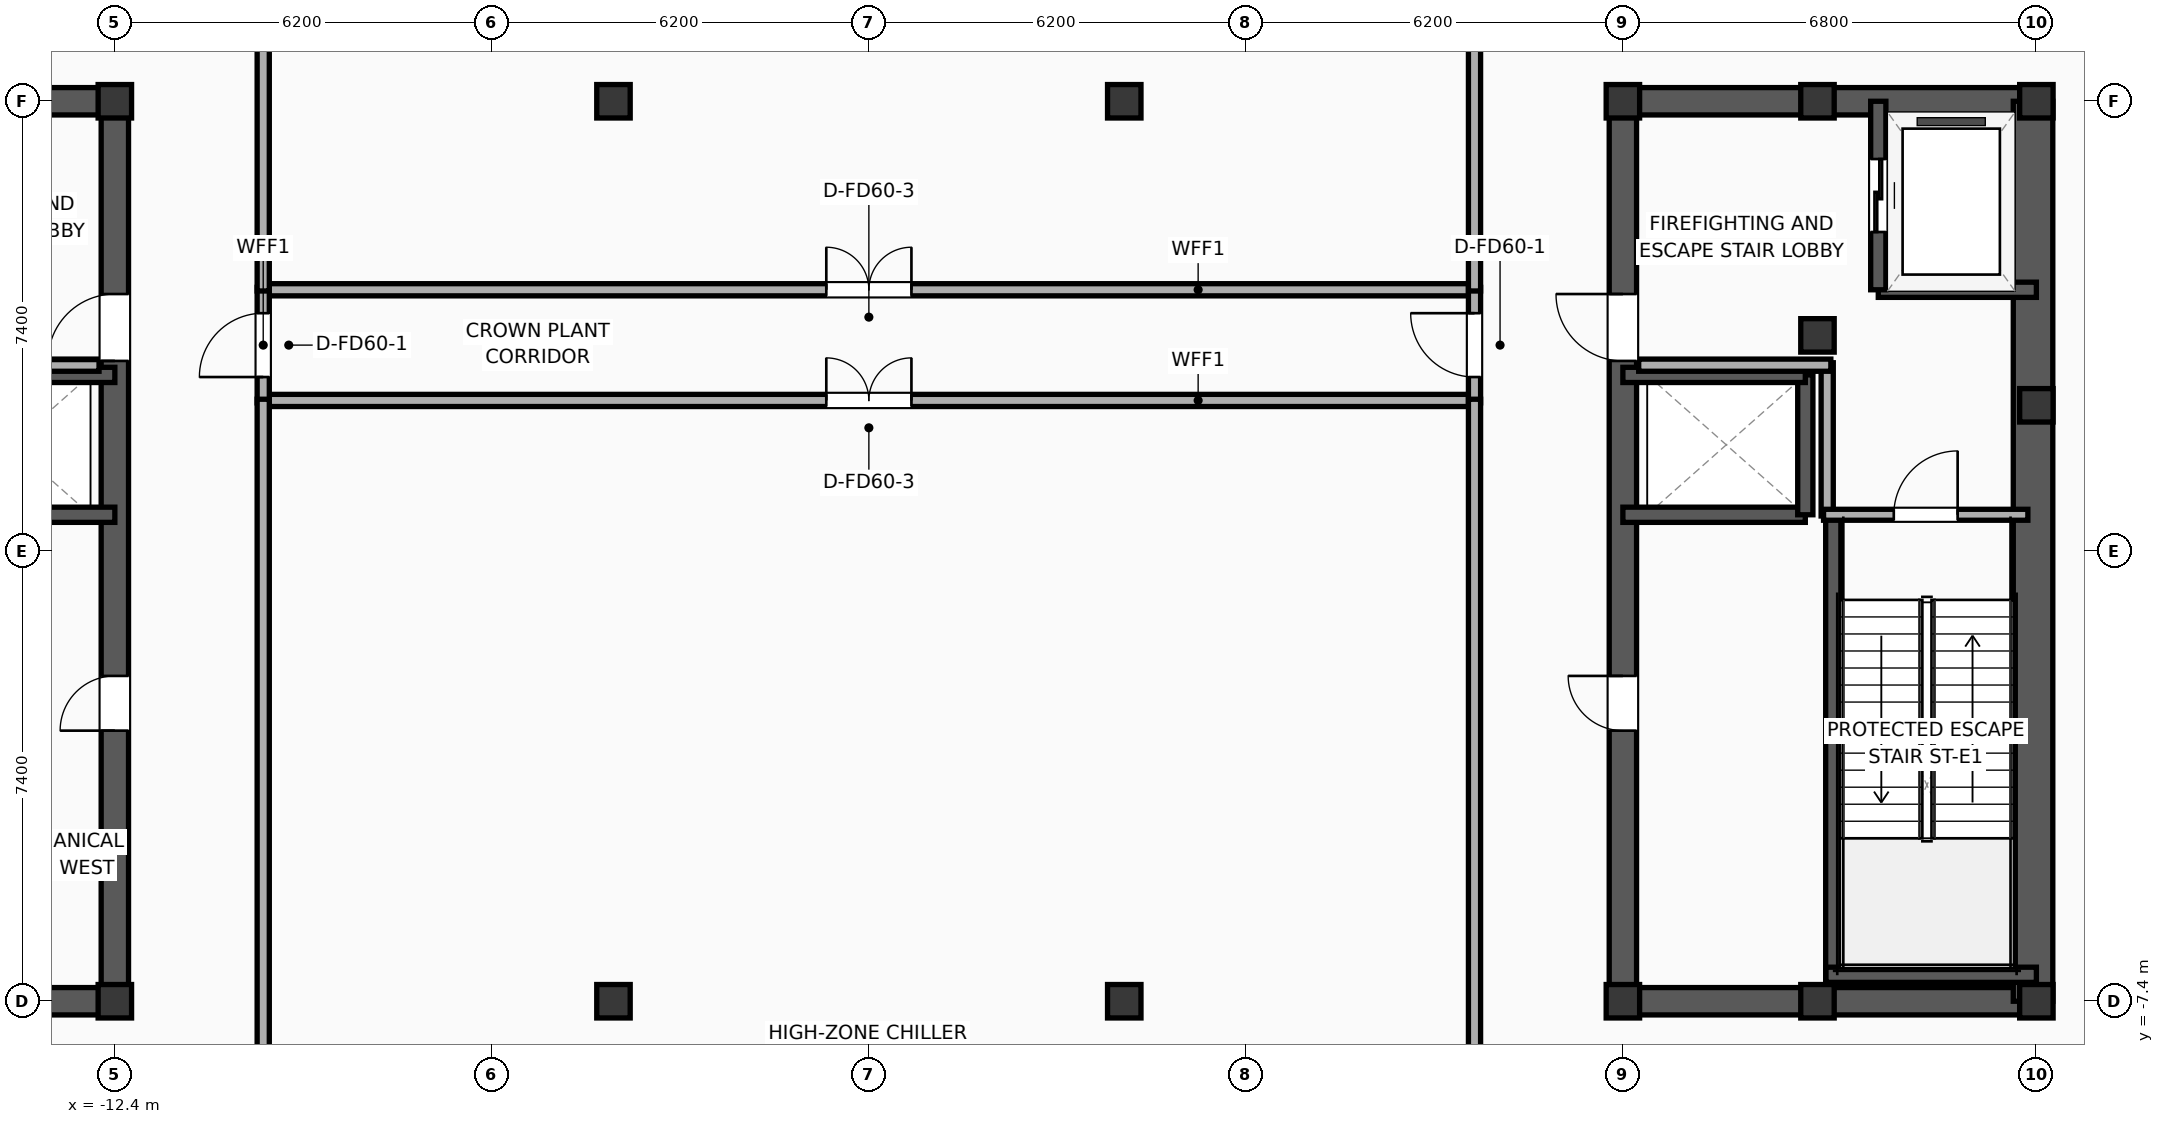
"""IFC4 building model, lengths in metres.
Left out: names, types, materials, properties, quantities, classifications, styles, units other than length and angle.
Written with IfcOpenShell. Run it as: python <this file> out.ifc"""

import sys

from ifc_helpers import new_model, si_unit, direction, frame, frame_2d, origin, origin_2d, place, context, subcontext, project, spatial, rectangle, hollow_rectangle, extrude, element, fill, save


model = new_model("IFC4")
c1 = context("Model", 3, precision=1e-05, world=origin(), true_north=direction((0.0, 1.0)))
c2 = subcontext(c1, "Body", "Model", "MODEL_VIEW")
j1 = project(units=[si_unit("LENGTHUNIT", "METRE"), si_unit("PLANEANGLEUNIT", "RADIAN")], contexts=[c1])
p1 = place(None, origin())
s1 = spatial("IfcSite", under=j1, at=p1, CompositionType="ELEMENT")
p2 = place(p1, origin())
s2 = spatial("IfcBuilding", under=s1, at=p2, CompositionType="ELEMENT")
p3 = place(p2, frame((0.0, 0.0, 310.7)))
s3 = spatial("IfcBuildingStorey", under=s2, at=p3, CompositionType="ELEMENT", Elevation=310.7)
for number, where, z_axis, x_axis in (
    (1, (-12.4, -7.4, 0.0), (0.0, 0.0, 1.0), (1.0, 0.0, 0.0)),
    (2, (-12.4, 7.4, 0.0), (0.0, 0.0, 1.0), (1.0, 0.0, 0.0)),
    (3, (12.4, -7.4, 0.0), (0.0, 0.0, 1.0), (1.0, 0.0, 0.0)),
    (4, (15.6, 3.55, 0.0), (0.0, 0.0, 1.0), (1.0, 0.0, 0.0)),
    (5, (12.4, 7.4, 0.0), (0.0, 0.0, 1.0), (1.0, 0.0, 0.0)),
    (6, (15.6, -7.4, 0.0), (0.0, 0.0, 1.0), (1.0, 0.0, 0.0)),
    (7, (15.6, 7.4, 0.0), (0.0, 0.0, 1.0), (1.0, 0.0, 0.0)),
    (8, (19.2, -7.4, 0.0), (0.0, 0.0, 1.0), (1.0, 0.0, 0.0)),
    (9, (19.2, 2.4, 0.0), (0.0, 0.0, 1.0), (1.0, 0.0, 0.0)),
    (10, (19.2, 7.4, 0.0), (0.0, 0.0, 1.0), (1.0, 0.0, 0.0)),
):
    element("IfcColumn", number, at=place(p3, frame(where, z_axis=z_axis, x_axis=x_axis)), inside=s3, PredefinedType="COLUMN", context=c2, shape_type="SweptSolid", body=[
        extrude(hollow_rectangle(XDim=0.55, YDim=0.55, WallThickness=0.022, at=origin_2d()), origin(), (0.0, 0.0, 1.0), 5.3),
    ])
for number, where, z_axis, x_axis in (
    (11, (-19.425, -7.4, 0.0), (0.0, 0.0, 1.0), (1.0, 0.0, 0.0)),
    (12, (-19.425, 7.4, 0.0), (0.0, 0.0, 1.0), (1.0, 0.0, 0.0)),
):
    element("IfcWall", number, at=place(p3, frame(where, z_axis=z_axis, x_axis=x_axis)), inside=s3, PredefinedType="SHEAR", context=c2, shape_type="SweptSolid", body=[
        extrude(rectangle(XDim=7.25, YDim=0.45, at=frame_2d((3.625, 0.0))), origin(), (0.0, 0.0, 1.0), 5.025),
    ])
p4 = place(p3, frame((-12.4, -7.4, 0.0), z_axis=(0.0, 0.0, 1.0), x_axis=(0.0, 1.0, 0.0)))
e13 = element("IfcWall", 13, at=p4, inside=s3, PredefinedType="SHEAR", context=c2, shape_type="SweptSolid", body=[
    extrude(rectangle(XDim=14.8, YDim=0.45, at=frame_2d((7.4, 0.0))), origin(), (0.0, 0.0, 1.0), 5.025),
])
p5 = place(p4, frame((10.53, 0.0, 0.0)))
e14 = element("IfcOpeningElement", 14, at=p5, cuts=e13, PredefinedType="OPENING", context=c2, shape_type="SweptSolid", body=[
    extrude(rectangle(XDim=1.1, YDim=2.05, at=frame_2d((0.55, 1.025))), frame((0.0, 0.235, 0.0), z_axis=(0.0, -1.0, 0.0), x_axis=(1.0, 0.0, 0.0)), (0.0, 0.0, 1.0), 0.47),
])
p6 = place(p4, frame((4.45, 0.0, 0.0)))
e15 = element("IfcOpeningElement", 15, at=p6, cuts=e13, PredefinedType="OPENING", context=c2, shape_type="SweptSolid", body=[
    extrude(rectangle(XDim=0.9, YDim=2.05, at=frame_2d((0.45, 1.025))), frame((0.0, 0.235, 0.0), z_axis=(0.0, -1.0, 0.0), x_axis=(1.0, 0.0, 0.0)), (0.0, 0.0, 1.0), 0.47),
])
for number, where, z_axis, x_axis in (
    (16, (12.175, -7.4, 0.0), (0.0, 0.0, 1.0), (1.0, 0.0, 0.0)),
    (17, (12.175, 7.4, 0.0), (0.0, 0.0, 1.0), (1.0, 0.0, 0.0)),
):
    element("IfcWall", number, at=place(p3, frame(where, z_axis=z_axis, x_axis=x_axis)), inside=s3, PredefinedType="SHEAR", context=c2, shape_type="SweptSolid", body=[
        extrude(rectangle(XDim=7.25, YDim=0.45, at=frame_2d((3.625, 0.0))), origin(), (0.0, 0.0, 1.0), 5.025),
    ])
p7 = place(p3, frame((12.4, -7.4, 0.0), z_axis=(0.0, 0.0, 1.0), x_axis=(0.0, 1.0, 0.0)))
e18 = element("IfcWall", 18, at=p7, inside=s3, PredefinedType="SHEAR", context=c2, shape_type="SweptSolid", body=[
    extrude(rectangle(XDim=14.8, YDim=0.45, at=frame_2d((7.4, 0.0))), origin(), (0.0, 0.0, 1.0), 5.025),
])
p8 = place(p7, frame((10.53, 0.0, 0.0)))
e19 = element("IfcOpeningElement", 19, at=p8, cuts=e18, PredefinedType="OPENING", context=c2, shape_type="SweptSolid", body=[
    extrude(rectangle(XDim=1.1, YDim=2.05, at=frame_2d((0.55, 1.025))), frame((0.0, 0.235, 0.0), z_axis=(0.0, -1.0, 0.0), x_axis=(1.0, 0.0, 0.0)), (0.0, 0.0, 1.0), 0.47),
])
p9 = place(p7, frame((4.45, 0.0, 0.0)))
e20 = element("IfcOpeningElement", 20, at=p9, cuts=e18, PredefinedType="OPENING", context=c2, shape_type="SweptSolid", body=[
    extrude(rectangle(XDim=0.9, YDim=2.05, at=frame_2d((0.45, 1.025))), frame((0.0, 0.235, 0.0), z_axis=(0.0, -1.0, 0.0), x_axis=(1.0, 0.0, 0.0)), (0.0, 0.0, 1.0), 0.47),
])
p10 = place(p3, frame((19.145, -7.4, 0.0), z_axis=(0.0, 0.0, 1.0), x_axis=(0.0, 1.0, 0.0)))
e21 = element("IfcWall", 21, at=p10, inside=s3, PredefinedType="SHEAR", context=c2, shape_type="SweptSolid", body=[
    extrude(rectangle(XDim=14.8, YDim=0.65, at=frame_2d((7.4, 0.0))), origin(), (0.0, 0.0, 1.0), 5.025),
])
p11 = place(p3, frame((15.86, -7.085, 0.0), z_axis=(0.0, 0.0, 1.0), x_axis=(0.0, 1.0, 0.0)))
e22 = element("IfcWall", 22, at=p11, inside=s3, PredefinedType="SOLIDWALL", context=c2, shape_type="SweptSolid", body=[
    extrude(rectangle(XDim=7.685, YDim=0.25, at=frame_2d((3.843, 0.0))), origin(), (0.0, 0.0, 1.0), 5.025),
])
p12 = place(p3, frame((15.74, -6.965, 0.0), z_axis=(0.0, 0.0, 1.0), x_axis=(1.0, 0.0, 0.0)))
e23 = element("IfcWall", 23, at=p12, inside=s3, PredefinedType="SOLIDWALL", context=c2, shape_type="SweptSolid", body=[
    extrude(rectangle(XDim=3.46, YDim=0.25, at=frame_2d((1.73, 0.0))), origin(), (0.0, 0.0, 1.0), 5.025),
])
for number, where, z_axis, x_axis in (
    (24, (-4.2, -7.4, 0.0), (0.0, 0.0, 1.0), (1.0, 0.0, 0.0)),
    (25, (-4.2, 7.4, 0.0), (0.0, 0.0, 1.0), (1.0, 0.0, 0.0)),
    (26, (4.2, -7.4, 0.0), (0.0, 0.0, 1.0), (1.0, 0.0, 0.0)),
    (27, (4.2, 7.4, 0.0), (0.0, 0.0, 1.0), (1.0, 0.0, 0.0)),
):
    element("IfcColumn", number, at=place(p3, frame(where, z_axis=z_axis, x_axis=x_axis)), inside=s3, PredefinedType="COLUMN", context=c2, shape_type="SweptSolid", body=[
        extrude(hollow_rectangle(XDim=0.55, YDim=0.55, WallThickness=0.022, at=origin_2d()), origin(), (0.0, 0.0, 1.0), 5.3),
    ])
p13 = place(p3, frame((16.6, 4.3, 0.0), z_axis=(0.0, 0.0, 1.0), x_axis=(1.0, 0.0, 0.0)))
e28 = element("IfcWall", 28, at=p13, inside=s3, PredefinedType="SOLIDWALL", context=c2, shape_type="SweptSolid", body=[
    extrude(rectangle(XDim=2.6, YDim=0.25, at=frame_2d((1.3, 0.0))), origin(), (0.0, 0.0, 1.0), 5.025),
])
p14 = place(p3, frame((16.6, 7.4, 0.0), z_axis=(0.0, 0.0, 1.0), x_axis=(0.0, -1.0, 0.0)))
e29 = element("IfcWall", 29, at=p14, inside=s3, PredefinedType="SOLIDWALL", context=c2, shape_type="SweptSolid", body=[
    extrude(rectangle(XDim=3.1, YDim=0.25, at=frame_2d((1.55, 0.0))), origin(), (0.0, 0.0, 1.0), 5.025),
])
p15 = place(p14, frame((0.95, 0.0, 0.0)))
e30 = element("IfcOpeningElement", 30, at=p15, cuts=e29, PredefinedType="OPENING", context=c2, shape_type="SweptSolid", body=[
    extrude(rectangle(XDim=1.2, YDim=2.05, at=frame_2d((0.6, 1.025))), frame((0.0, 0.135, 0.0), z_axis=(0.0, -1.0, 0.0), x_axis=(1.0, 0.0, 0.0)), (0.0, 0.0, 1.0), 0.27),
])
for number, where, z_axis, x_axis in (
    (31, (-15.4, 0.6, 0.0), (0.0, 0.0, 1.0), (1.0, 0.0, 0.0)),
    (32, (-12.4, 2.9, 0.0), (0.0, 0.0, 1.0), (-1.0, 0.0, 0.0)),
    (33, (12.4, 0.6, 0.0), (0.0, 0.0, 1.0), (1.0, 0.0, 0.0)),
):
    element("IfcWall", number, at=place(p3, frame(where, z_axis=z_axis, x_axis=x_axis)), inside=s3, PredefinedType="SOLIDWALL", context=c2, shape_type="SweptSolid", body=[
        extrude(rectangle(XDim=3.0, YDim=0.25, at=frame_2d((1.5, 0.0))), origin(), (0.0, 0.0, 1.0), 5.025),
    ])
p16 = place(p3, frame((15.4, 0.6, 0.0), z_axis=(0.0, 0.0, 1.0), x_axis=(0.0, 1.0, 0.0)))
e34 = element("IfcWall", 34, at=p16, inside=s3, PredefinedType="SOLIDWALL", context=c2, shape_type="SweptSolid", body=[
    extrude(rectangle(XDim=2.3, YDim=0.25, at=frame_2d((1.15, 0.0))), origin(), (0.0, 0.0, 1.0), 5.025),
])
p17 = place(p3, frame((15.4, 2.9, 0.0), z_axis=(0.0, 0.0, 1.0), x_axis=(-1.0, 0.0, 0.0)))
e35 = element("IfcWall", 35, at=p17, inside=s3, PredefinedType="SOLIDWALL", context=c2, shape_type="SweptSolid", body=[
    extrude(rectangle(XDim=3.0, YDim=0.25, at=frame_2d((1.5, 0.0))), origin(), (0.0, 0.0, 1.0), 5.025),
])
p18 = place(p3, frame((-15.82, 3.06, 0.0), z_axis=(0.0, 0.0, 1.0), x_axis=(1.0, 0.0, 0.0)))
e36 = element("IfcWall", 36, at=p18, inside=s3, PredefinedType="PARTITIONING", context=c2, shape_type="SweptSolid", body=[
    extrude(rectangle(XDim=3.16, YDim=0.2, at=frame_2d((1.58, 0.0))), origin(), (0.0, 0.0, 1.0), 5.025),
])
p19 = place(p3, frame((15.76, 0.58, 0.0), z_axis=(0.0, 0.0, 1.0), x_axis=(0.0, 1.0, 0.0)))
e37 = element("IfcWall", 37, at=p19, inside=s3, PredefinedType="PARTITIONING", context=c2, shape_type="SweptSolid", body=[
    extrude(rectangle(XDim=2.52, YDim=0.2, at=frame_2d((1.26, 0.0))), origin(), (0.0, 0.0, 1.0), 5.025),
])
p20 = place(p3, frame((12.66, 3.06, 0.0), z_axis=(0.0, 0.0, 1.0), x_axis=(1.0, 0.0, 0.0)))
e38 = element("IfcWall", 38, at=p20, inside=s3, PredefinedType="PARTITIONING", context=c2, shape_type="SweptSolid", body=[
    extrude(rectangle(XDim=3.16, YDim=0.2, at=frame_2d((1.58, 0.0))), origin(), (0.0, 0.0, 1.0), 5.025),
])
p21 = place(p3, frame((15.7, 0.6, 0.0), z_axis=(0.0, 0.0, 1.0), x_axis=(1.0, 0.0, 0.0)))
e39 = element("IfcWall", 39, at=p21, inside=s3, PredefinedType="PARTITIONING", context=c2, shape_type="SweptSolid", body=[
    extrude(rectangle(XDim=3.36, YDim=0.18, at=frame_2d((1.68, 0.0))), origin(), (0.0, 0.0, 1.0), 5.025),
])
p22 = place(p21, frame((1.155, 0.0, 0.0)))
e40 = element("IfcOpeningElement", 40, at=p22, cuts=e39, PredefinedType="OPENING", context=c2, shape_type="SweptSolid", body=[
    extrude(rectangle(XDim=1.05, YDim=2.05, at=frame_2d((0.525, 1.025))), frame((0.0, 0.1, 0.0), z_axis=(0.0, -1.0, 0.0), x_axis=(1.0, 0.0, 0.0)), (0.0, 0.0, 1.0), 0.2),
])
p23 = place(p3, frame((-9.98, 2.48, 0.0), z_axis=(0.0, 0.0, 1.0), x_axis=(1.0, 0.0, 0.0)))
e41 = element("IfcWall", 41, at=p23, inside=s3, PredefinedType="PARTITIONING", context=c2, shape_type="SweptSolid", body=[
    extrude(rectangle(XDim=19.96, YDim=0.2, at=frame_2d((9.98, 0.0))), origin(), (0.0, 0.0, 1.0), 4.595),
])
p24 = place(p23, frame((9.28, 0.0, 0.0)))
e42 = element("IfcOpeningElement", 42, at=p24, cuts=e41, PredefinedType="OPENING", context=c2, shape_type="SweptSolid", body=[
    extrude(rectangle(XDim=1.4, YDim=2.05, at=frame_2d((0.7, 1.025))), frame((0.0, 0.11, 0.0), z_axis=(0.0, -1.0, 0.0), x_axis=(1.0, 0.0, 0.0)), (0.0, 0.0, 1.0), 0.22),
])
p25 = place(p3, frame((-9.98, 4.3, 0.0), z_axis=(0.0, 0.0, 1.0), x_axis=(1.0, 0.0, 0.0)))
e43 = element("IfcWall", 43, at=p25, inside=s3, PredefinedType="PARTITIONING", context=c2, shape_type="SweptSolid", body=[
    extrude(rectangle(XDim=19.96, YDim=0.2, at=frame_2d((9.98, 0.0))), origin(), (0.0, 0.0, 1.0), 5.025),
])
p26 = place(p25, frame((9.28, 0.0, 0.0)))
e44 = element("IfcOpeningElement", 44, at=p26, cuts=e43, PredefinedType="OPENING", context=c2, shape_type="SweptSolid", body=[
    extrude(rectangle(XDim=1.4, YDim=2.05, at=frame_2d((0.7, 1.025))), frame((0.0, 0.11, 0.0), z_axis=(0.0, -1.0, 0.0), x_axis=(1.0, 0.0, 0.0)), (0.0, 0.0, 1.0), 0.22),
])
p27 = place(p3, frame((-9.96, 2.44, 0.0), z_axis=(0.0, 0.0, 1.0), x_axis=(0.0, 1.0, 0.0)))
e45 = element("IfcWall", 45, at=p27, inside=s3, PredefinedType="PARTITIONING", context=c2, shape_type="SweptSolid", body=[
    extrude(rectangle(XDim=1.9, YDim=0.2, at=frame_2d((0.95, 0.0))), origin(), (0.0, 0.0, 1.0), 5.025),
])
p28 = place(p27, frame((0.425, 0.0, 0.0)))
e46 = element("IfcOpeningElement", 46, at=p28, cuts=e45, PredefinedType="OPENING", context=c2, shape_type="SweptSolid", body=[
    extrude(rectangle(XDim=1.05, YDim=2.05, at=frame_2d((0.525, 1.025))), frame((0.0, 0.11, 0.0), z_axis=(0.0, -1.0, 0.0), x_axis=(1.0, 0.0, 0.0)), (0.0, 0.0, 1.0), 0.22),
])
p29 = place(p3, frame((9.96, 2.44, 0.0), z_axis=(0.0, 0.0, 1.0), x_axis=(0.0, 1.0, 0.0)))
e47 = element("IfcWall", 47, at=p29, inside=s3, PredefinedType="PARTITIONING", context=c2, shape_type="SweptSolid", body=[
    extrude(rectangle(XDim=1.9, YDim=0.2, at=frame_2d((0.95, 0.0))), origin(), (0.0, 0.0, 1.0), 5.025),
])
p30 = place(p29, frame((0.425, 0.0, 0.0)))
e48 = element("IfcOpeningElement", 48, at=p30, cuts=e47, PredefinedType="OPENING", context=c2, shape_type="SweptSolid", body=[
    extrude(rectangle(XDim=1.05, YDim=2.05, at=frame_2d((0.525, 1.025))), frame((0.0, 0.11, 0.0), z_axis=(0.0, -1.0, 0.0), x_axis=(1.0, 0.0, 0.0)), (0.0, 0.0, 1.0), 0.22),
])
p31 = place(p3, frame((-9.96, -17.125, 0.0), z_axis=(0.0, 0.0, 1.0), x_axis=(0.0, 1.0, 0.0)))
e49 = element("IfcWall", 49, at=p31, inside=s3, PredefinedType="PARTITIONING", context=c2, shape_type="SweptSolid", body=[
    extrude(rectangle(XDim=19.625, YDim=0.2, at=frame_2d((9.812, 0.0))), origin(), (0.0, 0.0, 1.0), 3.915),
])
p32 = place(p3, frame((-9.96, 4.28, 0.0), z_axis=(0.0, 0.0, 1.0), x_axis=(0.0, 1.0, 0.0)))
e50 = element("IfcWall", 50, at=p32, inside=s3, PredefinedType="PARTITIONING", context=c2, shape_type="SweptSolid", body=[
    extrude(rectangle(XDim=14.392, YDim=0.2, at=frame_2d((7.196, 0.0))), origin(), (0.0, 0.0, 1.0), 5.025),
])
p33 = place(p3, frame((9.96, -19.218, 0.0), z_axis=(0.0, 0.0, 1.0), x_axis=(0.0, 1.0, 0.0)))
e51 = element("IfcWall", 51, at=p33, inside=s3, PredefinedType="PARTITIONING", context=c2, shape_type="SweptSolid", body=[
    extrude(rectangle(XDim=21.718, YDim=0.2, at=frame_2d((10.859, 0.0))), origin(), (0.0, 0.0, 1.0), 3.915),
])
p34 = place(p3, frame((9.96, 4.28, 0.0), z_axis=(0.0, 0.0, 1.0), x_axis=(0.0, 1.0, 0.0)))
e52 = element("IfcWall", 52, at=p34, inside=s3, PredefinedType="PARTITIONING", context=c2, shape_type="SweptSolid", body=[
    extrude(rectangle(XDim=12.298, YDim=0.2, at=frame_2d((6.149, 0.0))), origin(), (0.0, 0.0, 1.0), 5.025),
])
p35 = place(p15, origin())
e53 = element("IfcDoor", 53, at=p35, inside=s3, OperationType="SLIDING_TO_LEFT", PredefinedType="DOOR", context=c2, shape_type="SweptSolid", body=[
    extrude(rectangle(XDim=1.2, YDim=2.05, at=frame_2d((0.6, 1.025))), frame((0.0, 0.025, 0.0), z_axis=(0.0, -1.0, 0.0), x_axis=(1.0, 0.0, 0.0)), (0.0, 0.0, 1.0), 0.05),
])
fill(e30, e53)
p36 = place(p22, origin())
e54 = element("IfcDoor", 54, at=p36, inside=s3, OperationType="SINGLE_SWING_RIGHT", PredefinedType="DOOR", context=c2, shape_type="SweptSolid", body=[
    extrude(rectangle(XDim=1.05, YDim=2.05, at=frame_2d((0.525, 1.025))), frame((0.0, 0.025, 0.0), z_axis=(0.0, -1.0, 0.0), x_axis=(1.0, 0.0, 0.0)), (0.0, 0.0, 1.0), 0.05),
])
fill(e40, e54)
p37 = place(p24, origin())
e55 = element("IfcDoor", 55, at=p37, inside=s3, OperationType="DOUBLE_DOOR_SINGLE_SWING", PredefinedType="DOOR", context=c2, shape_type="SweptSolid", body=[
    extrude(rectangle(XDim=1.4, YDim=2.05, at=frame_2d((0.7, 1.025))), frame((0.0, 0.025, 0.0), z_axis=(0.0, -1.0, 0.0), x_axis=(1.0, 0.0, 0.0)), (0.0, 0.0, 1.0), 0.05),
])
fill(e42, e55)
p38 = place(p26, origin())
e56 = element("IfcDoor", 56, at=p38, inside=s3, OperationType="DOUBLE_DOOR_SINGLE_SWING", PredefinedType="DOOR", context=c2, shape_type="SweptSolid", body=[
    extrude(rectangle(XDim=1.4, YDim=2.05, at=frame_2d((0.7, 1.025))), frame((0.0, 0.025, 0.0), z_axis=(0.0, -1.0, 0.0), x_axis=(1.0, 0.0, 0.0)), (0.0, 0.0, 1.0), 0.05),
])
fill(e44, e56)
p39 = place(p28, origin())
e57 = element("IfcDoor", 57, at=p39, inside=s3, OperationType="SINGLE_SWING_LEFT", PredefinedType="DOOR", context=c2, shape_type="SweptSolid", body=[
    extrude(rectangle(XDim=1.05, YDim=2.05, at=frame_2d((0.525, 1.025))), frame((0.0, 0.025, 0.0), z_axis=(0.0, -1.0, 0.0), x_axis=(1.0, 0.0, 0.0)), (0.0, 0.0, 1.0), 0.05),
])
fill(e46, e57)
p40 = place(p30, origin())
e58 = element("IfcDoor", 58, at=p40, inside=s3, OperationType="SINGLE_SWING_RIGHT", PredefinedType="DOOR", context=c2, shape_type="SweptSolid", body=[
    extrude(rectangle(XDim=1.05, YDim=2.05, at=frame_2d((0.525, 1.025))), frame((0.0, 0.025, 0.0), z_axis=(0.0, -1.0, 0.0), x_axis=(1.0, 0.0, 0.0)), (0.0, 0.0, 1.0), 0.05),
])
fill(e48, e58)
p41 = place(p5, origin())
e59 = element("IfcDoor", 59, at=p41, inside=s3, OperationType="SINGLE_SWING_LEFT", PredefinedType="DOOR", context=c2, shape_type="SweptSolid", body=[
    extrude(rectangle(XDim=1.1, YDim=2.05, at=frame_2d((0.55, 1.025))), frame((0.0, 0.025, 0.0), z_axis=(0.0, -1.0, 0.0), x_axis=(1.0, 0.0, 0.0)), (0.0, 0.0, 1.0), 0.05),
])
fill(e14, e59)
p42 = place(p6, origin())
e60 = element("IfcDoor", 60, at=p42, inside=s3, OperationType="SINGLE_SWING_LEFT", PredefinedType="DOOR", context=c2, shape_type="SweptSolid", body=[
    extrude(rectangle(XDim=0.9, YDim=2.05, at=frame_2d((0.45, 1.025))), frame((0.0, 0.025, 0.0), z_axis=(0.0, -1.0, 0.0), x_axis=(1.0, 0.0, 0.0)), (0.0, 0.0, 1.0), 0.05),
])
fill(e15, e60)
p43 = place(p8, origin())
e61 = element("IfcDoor", 61, at=p43, inside=s3, OperationType="SINGLE_SWING_RIGHT", PredefinedType="DOOR", context=c2, shape_type="SweptSolid", body=[
    extrude(rectangle(XDim=1.1, YDim=2.05, at=frame_2d((0.55, 1.025))), frame((0.0, 0.025, 0.0), z_axis=(0.0, -1.0, 0.0), x_axis=(1.0, 0.0, 0.0)), (0.0, 0.0, 1.0), 0.05),
])
fill(e19, e61)
p44 = place(p9, origin())
e62 = element("IfcDoor", 62, at=p44, inside=s3, OperationType="SINGLE_SWING_RIGHT", PredefinedType="DOOR", context=c2, shape_type="SweptSolid", body=[
    extrude(rectangle(XDim=0.9, YDim=2.05, at=frame_2d((0.45, 1.025))), frame((0.0, 0.025, 0.0), z_axis=(0.0, -1.0, 0.0), x_axis=(1.0, 0.0, 0.0)), (0.0, 0.0, 1.0), 0.05),
])
fill(e20, e62)
save(model, sys.argv[1])
